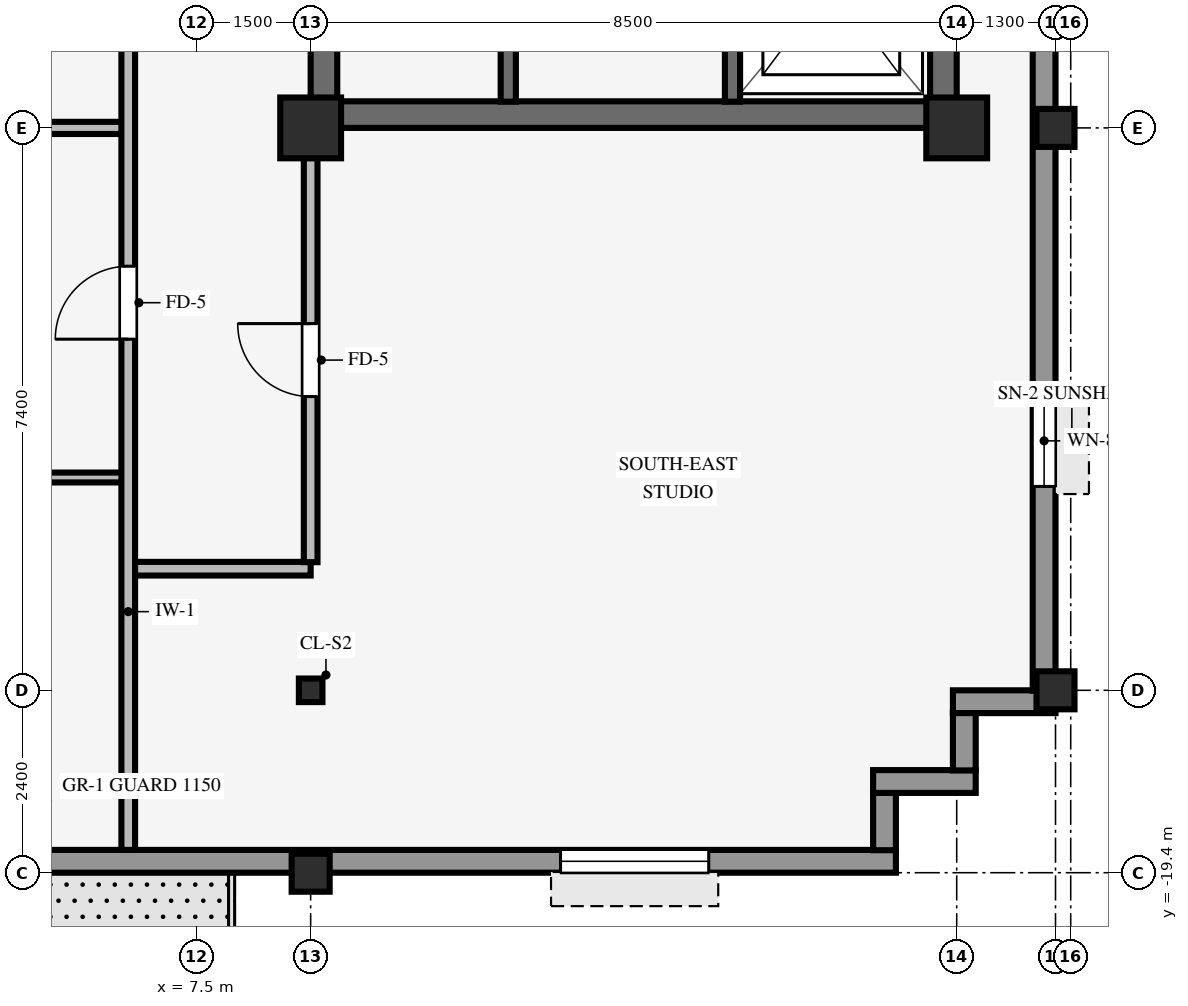
"""IFC4 building model, lengths in metres.
Left out: names, types, materials, properties, quantities, classifications, styles, units other than length and angle.
Written with IfcOpenShell. Run it as: python <this file> out.ifc"""

import sys

from ifc_helpers import new_model, si_unit, direction, frame, frame_2d, origin, origin_2d, place, context, subcontext, project, spatial, rectangle, hollow_rectangle, i_section, extrude, source, transform, mapped, element, fill, save


model = new_model("IFC4")
c1 = context("Model", 3, precision=1e-05, world=origin(), true_north=direction((0.0, 1.0)))
c2 = subcontext(c1, "Body", "Model", "MODEL_VIEW")
j1 = project(units=[si_unit("LENGTHUNIT", "METRE"), si_unit("PLANEANGLEUNIT", "RADIAN")], contexts=[c1])
p1 = place(None, origin())
s1 = spatial("IfcSite", under=j1, at=p1, CompositionType="ELEMENT")
p2 = place(p1, origin())
s2 = spatial("IfcBuilding", under=s1, at=p2, CompositionType="ELEMENT")
p3 = place(p2, frame((0.0, 0.0, 234.7)))
s3 = spatial("IfcBuildingStorey", under=s2, at=p3, CompositionType="ELEMENT", Elevation=234.7)
p4 = place(p3, frame((9.0, -9.425, 0.0), z_axis=(0.0, 0.0, 1.0), x_axis=(1.0, 0.0, 0.0)))
e1 = element("IfcWall", 1, at=p4, inside=s3, PredefinedType="SHEAR", context=c2, shape_type="SweptSolid", body=[
    extrude(rectangle(XDim=8.5, YDim=0.35, at=frame_2d((4.25, 0.0))), origin(), (0.0, 0.0, 1.0), 3.37),
])
p5 = place(p3, frame((9.175, -9.255, 0.0), z_axis=(0.0, 0.0, 1.0), x_axis=(0.0, 1.0, 0.0)))
e2 = element("IfcWall", 2, at=p5, inside=s3, PredefinedType="SHEAR", context=c2, shape_type="SweptSolid", body=[
    extrude(rectangle(XDim=18.51, YDim=0.35, at=frame_2d((9.255, 0.0))), origin(), (0.0, 0.0, 1.0), 3.37),
])
p6 = place(p5, frame((8.655, 0.0, 0.0)))
e3 = element("IfcOpeningElement", 3, at=p6, cuts=e2, PredefinedType="OPENING", context=c2, shape_type="SweptSolid", body=[
    extrude(rectangle(XDim=1.2, YDim=2.15, at=frame_2d((0.6, 1.075))), frame((0.0, 0.185, 0.0), z_axis=(0.0, -1.0, 0.0), x_axis=(1.0, 0.0, 0.0)), (0.0, 0.0, 1.0), 0.37),
])
p7 = place(p3, frame((17.325, -9.255, 0.0), z_axis=(0.0, 0.0, 1.0), x_axis=(0.0, 1.0, 0.0)))
e4 = element("IfcWall", 4, at=p7, inside=s3, PredefinedType="SHEAR", context=c2, shape_type="SweptSolid", body=[
    extrude(rectangle(XDim=18.51, YDim=0.35, at=frame_2d((9.255, 0.0))), origin(), (0.0, 0.0, 1.0), 3.37),
])
for number, where, z_axis, x_axis in (
    (5, (9.0, -9.6, 0.0), (0.0, 0.0, 1.0), (1.0, 0.0, 0.0)),
    (6, (17.5, -9.6, 0.0), (0.0, 0.0, 1.0), (1.0, 0.0, 0.0)),
):
    element("IfcColumn", number, at=place(p3, frame(where, z_axis=z_axis, x_axis=x_axis)), inside=s3, PredefinedType="COLUMN", context=c2, shape_type="SweptSolid", body=[
        extrude(rectangle(XDim=0.8, YDim=0.8, at=origin_2d()), origin(), (0.0, 0.0, 1.0), 3.37),
    ])
for number, where, z_axis, x_axis in (
    (7, (18.8, -17.0, 0.0), (0.0, 0.0, 1.0), (1.0, 0.0, 0.0)),
    (8, (18.8, -9.6, 0.0), (0.0, 0.0, 1.0), (1.0, 0.0, 0.0)),
    (9, (9.0, -19.4, 0.0), (0.0, 0.0, 1.0), (1.0, 0.0, 0.0)),
):
    element("IfcColumn", number, at=place(p3, frame(where, z_axis=z_axis, x_axis=x_axis)), inside=s3, PredefinedType="COLUMN", context=c2, shape_type="SweptSolid", body=[
        extrude(hollow_rectangle(XDim=0.5, YDim=0.5, WallThickness=0.032, InnerFilletRadius=0.032, OuterFilletRadius=0.064, at=origin_2d()), origin(), (0.0, 0.0, 1.0), 3.37),
    ])
p8 = place(p3, frame((9.0, -17.0, 0.0), z_axis=(0.0, 0.0, 1.0), x_axis=(1.0, 0.0, 0.0)))
e10 = element("IfcColumn", 10, at=p8, inside=s3, PredefinedType="COLUMN", context=c2, shape_type="SweptSolid", body=[
    extrude(i_section(OverallWidth=0.31, OverallDepth=0.31, WebThickness=0.015, FlangeThickness=0.015, FilletRadius=0.015, at=origin_2d()), origin(), (0.0, 0.0, 1.0), 3.37),
])
p9 = place(p3, frame((-24.3, -19.25, 0.0), z_axis=(0.0, 0.0, 1.0), x_axis=(1.0, 0.0, 0.0)))
e11 = element("IfcWall", 11, at=p9, inside=s3, PredefinedType="STANDARD", context=c2, shape_type="SweptSolid", body=[
    extrude(rectangle(XDim=41.0, YDim=0.3, at=frame_2d((20.5, 0.0))), origin(), (0.0, 0.0, 1.0), 2.705),
])
p10 = place(p9, frame((29.55, 0.0, 0.0), z_axis=(0.0, 0.0, 1.0), x_axis=(-1.0, 0.0, 0.0)))
e12 = element("IfcOpeningElement", 12, at=p10, cuts=e11, PredefinedType="OPENING", context=c2, shape_type="SweptSolid", body=[
    extrude(rectangle(XDim=1.05, YDim=2.1, at=frame_2d((0.525, 1.05))), frame((0.0, 0.16, 0.0), z_axis=(0.0, -1.0, 0.0), x_axis=(1.0, 0.0, 0.0)), (0.0, 0.0, 1.0), 0.32),
])
p11 = place(p9, frame((2.462, 0.0, 0.8)))
e13 = element("IfcOpeningElement", 13, at=p11, cuts=e11, PredefinedType="OPENING", context=c2, shape_type="SweptSolid", body=[
    extrude(rectangle(XDim=1.95, YDim=1.48, at=frame_2d((0.975, 0.74))), frame((0.0, 0.16, 0.0), z_axis=(0.0, -1.0, 0.0), x_axis=(1.0, 0.0, 0.0)), (0.0, 0.0, 1.0), 0.32),
])
p12 = place(p9, frame((7.788, 0.0, 0.8)))
e14 = element("IfcOpeningElement", 14, at=p12, cuts=e11, PredefinedType="OPENING", context=c2, shape_type="SweptSolid", body=[
    extrude(rectangle(XDim=1.95, YDim=1.48, at=frame_2d((0.975, 0.74))), frame((0.0, 0.16, 0.0), z_axis=(0.0, -1.0, 0.0), x_axis=(1.0, 0.0, 0.0)), (0.0, 0.0, 1.0), 0.32),
])
p13 = place(p9, frame((12.212, 0.0, 0.8)))
e15 = element("IfcOpeningElement", 15, at=p13, cuts=e11, PredefinedType="OPENING", context=c2, shape_type="SweptSolid", body=[
    extrude(rectangle(XDim=1.95, YDim=1.48, at=frame_2d((0.975, 0.74))), frame((0.0, 0.16, 0.0), z_axis=(0.0, -1.0, 0.0), x_axis=(1.0, 0.0, 0.0)), (0.0, 0.0, 1.0), 0.32),
])
p14 = place(p9, frame((17.988, 0.0, 0.8)))
e16 = element("IfcOpeningElement", 16, at=p14, cuts=e11, PredefinedType="OPENING", context=c2, shape_type="SweptSolid", body=[
    extrude(rectangle(XDim=1.95, YDim=1.48, at=frame_2d((0.975, 0.74))), frame((0.0, 0.16, 0.0), z_axis=(0.0, -1.0, 0.0), x_axis=(1.0, 0.0, 0.0)), (0.0, 0.0, 1.0), 0.32),
])
p15 = place(p9, frame((21.512, 0.0, 0.8)))
e17 = element("IfcOpeningElement", 17, at=p15, cuts=e11, PredefinedType="OPENING", context=c2, shape_type="SweptSolid", body=[
    extrude(rectangle(XDim=1.95, YDim=1.48, at=frame_2d((0.975, 0.74))), frame((0.0, 0.16, 0.0), z_axis=(0.0, -1.0, 0.0), x_axis=(1.0, 0.0, 0.0)), (0.0, 0.0, 1.0), 0.32),
])
p16 = place(p9, frame((25.938, 0.0, 0.8)))
e18 = element("IfcOpeningElement", 18, at=p16, cuts=e11, PredefinedType="OPENING", context=c2, shape_type="SweptSolid", body=[
    extrude(rectangle(XDim=1.95, YDim=1.48, at=frame_2d((0.975, 0.74))), frame((0.0, 0.16, 0.0), z_axis=(0.0, -1.0, 0.0), x_axis=(1.0, 0.0, 0.0)), (0.0, 0.0, 1.0), 0.32),
])
p17 = place(p9, frame((36.587, 0.0, 0.8)))
e19 = element("IfcOpeningElement", 19, at=p17, cuts=e11, PredefinedType="OPENING", context=c2, shape_type="SweptSolid", body=[
    extrude(rectangle(XDim=1.95, YDim=1.48, at=frame_2d((0.975, 0.74))), frame((0.0, 0.16, 0.0), z_axis=(0.0, -1.0, 0.0), x_axis=(1.0, 0.0, 0.0)), (0.0, 0.0, 1.0), 0.32),
])
p18 = place(p3, frame((16.55, -19.104, 0.0), z_axis=(0.0, 0.0, 1.0), x_axis=(0.0, 1.0, 0.0)))
e20 = element("IfcWall", 20, at=p18, inside=s3, PredefinedType="STANDARD", context=c2, shape_type="SweptSolid", body=[
    extrude(rectangle(XDim=0.758, YDim=0.3, at=frame_2d((0.379, 0.0))), origin(), (0.0, 0.0, 1.0), 2.892),
])
p19 = place(p3, frame((16.4, -18.2, 0.0), z_axis=(0.0, 0.0, 1.0), x_axis=(1.0, 0.0, 0.0)))
e21 = element("IfcWall", 21, at=p19, inside=s3, PredefinedType="STANDARD", context=c2, shape_type="SweptSolid", body=[
    extrude(rectangle(XDim=1.35, YDim=0.3, at=frame_2d((0.675, 0.0))), origin(), (0.0, 0.0, 1.0), 2.892),
])
p20 = place(p3, frame((17.6, -18.054, 0.0), z_axis=(0.0, 0.0, 1.0), x_axis=(0.0, 1.0, 0.0)))
e22 = element("IfcWall", 22, at=p20, inside=s3, PredefinedType="STANDARD", context=c2, shape_type="SweptSolid", body=[
    extrude(rectangle(XDim=0.758, YDim=0.3, at=frame_2d((0.379, 0.0))), origin(), (0.0, 0.0, 1.0), 2.892),
])
p21 = place(p3, frame((17.45, -17.15, 0.0), z_axis=(0.0, 0.0, 1.0), x_axis=(1.0, 0.0, 0.0)))
e23 = element("IfcWall", 23, at=p21, inside=s3, PredefinedType="STANDARD", context=c2, shape_type="SweptSolid", body=[
    extrude(rectangle(XDim=1.35, YDim=0.3, at=frame_2d((0.675, 0.0))), origin(), (0.0, 0.0, 1.0), 2.892),
])
p22 = place(p3, frame((18.65, -17.004, 0.0), z_axis=(0.0, 0.0, 1.0), x_axis=(0.0, 1.0, 0.0)))
e24 = element("IfcWall", 24, at=p22, inside=s3, PredefinedType="STANDARD", context=c2, shape_type="SweptSolid", body=[
    extrude(rectangle(XDim=34.008, YDim=0.3, at=frame_2d((17.004, 0.0))), origin(), (0.0, 0.0, 1.0), 2.705),
])
p23 = place(p22, frame((2.686, 0.0, 0.8)))
e25 = element("IfcOpeningElement", 25, at=p23, cuts=e24, PredefinedType="OPENING", context=c2, shape_type="SweptSolid", body=[
    extrude(rectangle(XDim=1.2, YDim=1.48, at=frame_2d((0.6, 0.74))), frame((0.0, 0.16, 0.0), z_axis=(0.0, -1.0, 0.0), x_axis=(1.0, 0.0, 0.0)), (0.0, 0.0, 1.0), 0.32),
])
p24 = place(p22, frame((30.122, 0.0, 0.8)))
e26 = element("IfcOpeningElement", 26, at=p24, cuts=e24, PredefinedType="OPENING", context=c2, shape_type="SweptSolid", body=[
    extrude(rectangle(XDim=1.2, YDim=1.48, at=frame_2d((0.6, 0.74))), frame((0.0, 0.16, 0.0), z_axis=(0.0, -1.0, 0.0), x_axis=(1.0, 0.0, 0.0)), (0.0, 0.0, 1.0), 0.32),
])
p25 = place(p3, frame((14.55, -9.255, 0.0), z_axis=(0.0, 0.0, 1.0), x_axis=(0.0, 1.0, 0.0)))
e27 = element("IfcWall", 27, at=p25, inside=s3, PredefinedType="SHEAR", context=c2, shape_type="SweptSolid", body=[
    extrude(rectangle(XDim=10.16, YDim=0.2, at=frame_2d((5.08, 0.0))), origin(), (0.0, 0.0, 1.0), 3.37),
])
p26 = place(p25, frame((6.615, 0.0, 0.0)))
e28 = element("IfcOpeningElement", 28, at=p26, cuts=e27, PredefinedType="OPENING", context=c2, shape_type="SweptSolid", body=[
    extrude(rectangle(XDim=0.88, YDim=2.1, at=frame_2d((0.44, 1.05))), frame((0.0, 0.11, 0.0), z_axis=(0.0, -1.0, 0.0), x_axis=(1.0, 0.0, 0.0)), (0.0, 0.0, 1.0), 0.22),
])
p27 = place(p25, frame((0.98, 0.0, 0.0)))
e29 = element("IfcOpeningElement", 29, at=p27, cuts=e27, PredefinedType="OPENING", context=c2, shape_type="SweptSolid", body=[
    extrude(rectangle(XDim=1.15, YDim=2.15, at=frame_2d((0.575, 1.075))), frame((0.0, 0.11, 0.0), z_axis=(0.0, -1.0, 0.0), x_axis=(1.0, 0.0, 0.0)), (0.0, 0.0, 1.0), 0.22),
])
p28 = place(p3, frame((11.6, -9.255, 0.0), z_axis=(0.0, 0.0, 1.0), x_axis=(0.0, 1.0, 0.0)))
e30 = element("IfcWall", 30, at=p28, inside=s3, PredefinedType="SHEAR", context=c2, shape_type="SweptSolid", body=[
    extrude(rectangle(XDim=8.025, YDim=0.2, at=frame_2d((4.012, 0.0))), origin(), (0.0, 0.0, 1.0), 3.37),
])
p29 = place(p28, frame((5.615, 0.0, 0.0)))
e31 = element("IfcOpeningElement", 31, at=p29, cuts=e30, PredefinedType="OPENING", context=c2, shape_type="SweptSolid", body=[
    extrude(rectangle(XDim=0.88, YDim=2.1, at=frame_2d((0.44, 1.05))), frame((0.0, 0.11, 0.0), z_axis=(0.0, -1.0, 0.0), x_axis=(1.0, 0.0, 0.0)), (0.0, 0.0, 1.0), 0.22),
])
p30 = place(p3, frame((6.661, -15.4, 0.0), z_axis=(0.0, 0.0, 1.0), x_axis=(1.0, 0.0, 0.0)))
e32 = element("IfcWall", 32, at=p30, inside=s3, PredefinedType="PARTITIONING", context=c2, shape_type="SweptSolid", body=[
    extrude(rectangle(XDim=2.339, YDim=0.18, at=frame_2d((1.169, 0.0))), origin(), (0.0, 0.0, 1.0), 3.36),
])
p31 = place(p3, frame((-6.539, -14.2, 0.0), z_axis=(0.0, 0.0, 1.0), x_axis=(1.0, 0.0, 0.0)))
e33 = element("IfcWall", 33, at=p31, inside=s3, PredefinedType="PARTITIONING", context=c2, shape_type="SweptSolid", body=[
    extrude(rectangle(XDim=13.078, YDim=0.13, at=frame_2d((6.539, 0.0))), origin(), (0.0, 0.0, 1.0), 3.36),
])
p32 = place(p3, frame((0.151, -9.6, 0.0), z_axis=(0.0, 0.0, 1.0), x_axis=(1.0, 0.0, 0.0)))
e34 = element("IfcWall", 34, at=p32, inside=s3, PredefinedType="PARTITIONING", context=c2, shape_type="SweptSolid", body=[
    extrude(rectangle(XDim=6.388, YDim=0.16, at=frame_2d((3.194, 0.0))), origin(), (0.0, 0.0, 1.0), 2.405),
])
p33 = place(p3, frame((6.6, -19.1, 0.0), z_axis=(0.0, 0.0, 1.0), x_axis=(0.0, 1.0, 0.0)))
e35 = element("IfcWall", 35, at=p33, inside=s3, PredefinedType="PARTITIONING", context=c2, shape_type="SweptSolid", body=[
    extrude(rectangle(XDim=17.764, YDim=0.18, at=frame_2d((8.882, 0.0))), origin(), (0.0, 0.0, 1.0), 3.36),
])
p34 = place(p33, frame((13.152, 0.0, 0.0)))
e36 = element("IfcOpeningElement", 36, at=p34, cuts=e35, PredefinedType="OPENING", context=c2, shape_type="SweptSolid", body=[
    extrude(rectangle(XDim=0.96, YDim=2.1, at=frame_2d((0.48, 1.05))), frame((0.0, 0.1, 0.0), z_axis=(0.0, -1.0, 0.0), x_axis=(1.0, 0.0, 0.0)), (0.0, 0.0, 1.0), 0.2),
])
p35 = place(p33, frame((6.72, 0.0, 0.0)))
e37 = element("IfcOpeningElement", 37, at=p35, cuts=e35, PredefinedType="OPENING", context=c2, shape_type="SweptSolid", body=[
    extrude(rectangle(XDim=0.96, YDim=2.1, at=frame_2d((0.48, 1.05))), frame((0.0, 0.1, 0.0), z_axis=(0.0, -1.0, 0.0), x_axis=(1.0, 0.0, 0.0)), (0.0, 0.0, 1.0), 0.2),
])
p36 = place(p3, frame((9.0, -15.314, 0.0), z_axis=(0.0, 0.0, 1.0), x_axis=(0.0, 1.0, 0.0)))
e38 = element("IfcWall", 38, at=p36, inside=s3, PredefinedType="PARTITIONING", context=c2, shape_type="SweptSolid", body=[
    extrude(rectangle(XDim=5.318, YDim=0.18, at=frame_2d((2.659, 0.0))), origin(), (0.0, 0.0, 1.0), 2.892),
])
p37 = place(p36, frame((2.179, 0.0, 0.0)))
e39 = element("IfcOpeningElement", 39, at=p37, cuts=e38, PredefinedType="OPENING", context=c2, shape_type="SweptSolid", body=[
    extrude(rectangle(XDim=0.96, YDim=2.1, at=frame_2d((0.48, 1.05))), frame((0.0, 0.1, 0.0), z_axis=(0.0, -1.0, 0.0), x_axis=(1.0, 0.0, 0.0)), (0.0, 0.0, 1.0), 0.2),
])
m1 = source(origin(), c2, "Body", "SweptSolid", [
    extrude(rectangle(XDim=1.95, YDim=1.48, at=frame_2d((0.975, 0.74))), frame((0.0, 0.03, 0.0), z_axis=(0.0, -1.0, 0.0), x_axis=(1.0, 0.0, 0.0)), (0.0, 0.0, 1.0), 0.06),
])
p38 = place(p17, origin())
e40 = element("IfcWindow", 40, at=p38, inside=s3, PartitioningType="SINGLE_PANEL", PredefinedType="WINDOW", context=c2, shape_type="MappedRepresentation", body=[
    mapped(m1, transform((0.0, 0.0, 0.0), scale=1.0)),
])
fill(e19, e40)
m2 = source(origin(), c2, "Body", "SweptSolid", [
    extrude(rectangle(XDim=1.2, YDim=1.48, at=frame_2d((0.6, 0.74))), frame((0.0, 0.03, 0.0), z_axis=(0.0, -1.0, 0.0), x_axis=(1.0, 0.0, 0.0)), (0.0, 0.0, 1.0), 0.06),
])
p39 = place(p23, origin())
e41 = element("IfcWindow", 41, at=p39, inside=s3, PartitioningType="SINGLE_PANEL", PredefinedType="WINDOW", context=c2, shape_type="MappedRepresentation", body=[
    mapped(m2, transform((0.0, 0.0, 0.0), scale=1.0)),
])
fill(e25, e41)
m3 = source(origin(), c2, "Body", "SweptSolid", [
    extrude(rectangle(XDim=0.96, YDim=2.1, at=frame_2d((0.48, 1.05))), frame((0.0, 0.025, 0.0), z_axis=(0.0, -1.0, 0.0), x_axis=(1.0, 0.0, 0.0)), (0.0, 0.0, 1.0), 0.05),
])
p40 = place(p37, origin())
e42 = element("IfcDoor", 42, at=p40, inside=s3, OperationType="SINGLE_SWING_RIGHT", PredefinedType="DOOR", context=c2, shape_type="MappedRepresentation", body=[
    mapped(m3, transform((0.0, 0.0, 0.0), scale=1.0)),
])
fill(e39, e42)
p41 = place(p35, origin())
e43 = element("IfcDoor", 43, at=p41, inside=s3, OperationType="SINGLE_SWING_LEFT", PredefinedType="DOOR", context=c2, shape_type="MappedRepresentation", body=[
    mapped(m3, transform((0.0, 0.0, 0.0), scale=1.0)),
])
fill(e37, e43)
save(model, sys.argv[1])
